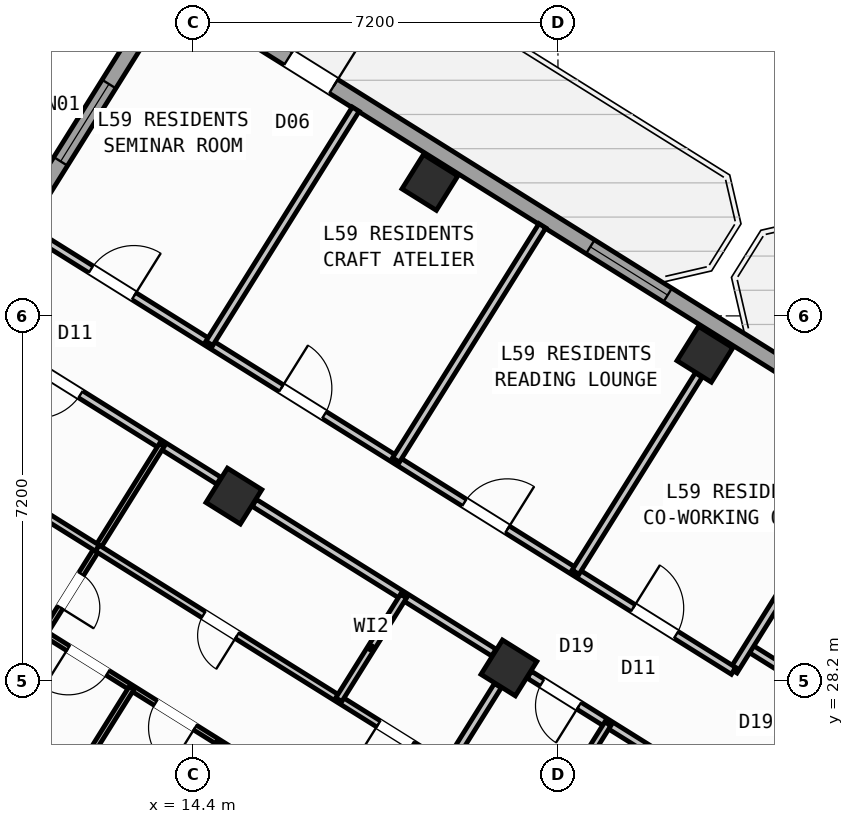
"""IFC4 building model, lengths in metres.
Left out: names, types, materials, properties, quantities, classifications, styles, units other than length and angle.
Written with IfcOpenShell. Run it as: python <this file> out.ifc"""

import sys

from ifc_helpers import new_model, si_unit, direction, frame, frame_2d, origin, origin_2d, place, context, subcontext, project, spatial, rectangle, hollow_rectangle, extrude, source, transform, mapped, element, fill, save


model = new_model("IFC4")
c1 = context("Model", 3, precision=1e-05, world=origin(), true_north=direction((0.0, 1.0)))
c2 = subcontext(c1, "Body", "Model", "MODEL_VIEW")
j1 = project(units=[si_unit("LENGTHUNIT", "METRE"), si_unit("PLANEANGLEUNIT", "RADIAN")], contexts=[c1])
p1 = place(None, origin())
s1 = spatial("IfcSite", under=j1, at=p1, CompositionType="ELEMENT")
p2 = place(p1, origin())
s2 = spatial("IfcBuilding", under=s1, at=p2, CompositionType="ELEMENT")
p3 = place(p2, frame((0.0, 0.0, 233.7)))
s3 = spatial("IfcBuildingStorey", under=s2, at=p3, CompositionType="ELEMENT", Elevation=233.7)
m1 = source(origin(), c2, "Body", "SweptSolid", [
    extrude(hollow_rectangle(XDim=0.8, YDim=0.8, WallThickness=0.032, at=origin_2d()), origin(), (0.0, 0.0, 1.0), 4.8),
])
for number, where, z_axis, x_axis in (
    (1, (24.5, 34.643, 0.0), (0.0, 0.0, 1.0), (-0.848, 0.53, 0.0)),
    (2, (20.632, 28.452, 0.0), (0.0, 0.0, 1.0), (-0.848, 0.53, 0.0)),
    (3, (19.073, 38.034, 0.0), (0.0, 0.0, 1.0), (-0.848, 0.53, 0.0)),
    (4, (15.205, 31.844, 0.0), (0.0, 0.0, 1.0), (-0.848, 0.53, 0.0)),
):
    element("IfcColumn", number, at=place(p3, frame(where, z_axis=z_axis, x_axis=x_axis)), inside=s3, PredefinedType="COLUMN", context=c2, shape_type="MappedRepresentation", body=[
        mapped(m1, transform((0.0, 0.0, 0.0), scale=1.0)),
    ])
p4 = place(p3, frame((2.415, 23.452, 0.0), z_axis=(0.0, 0.0, 1.0), x_axis=(0.52991049553, 0.848053575387, 0.0)))
e5 = element("IfcWall", 5, at=p4, inside=s3, PredefinedType="STANDARD", context=c2, shape_type="SweptSolid", body=[
    extrude(rectangle(XDim=21.587, YDim=0.32, at=frame_2d((10.794, 0.0))), origin(), (0.0, 0.0, 1.0), 4.075),
])
p5 = place(p4, frame((8.026, 0.0, 0.75)))
e6 = element("IfcOpeningElement", 6, at=p5, cuts=e5, PredefinedType="OPENING", context=c2, shape_type="SweptSolid", body=[
    extrude(rectangle(XDim=2.4, YDim=1.6, at=frame_2d((1.2, 0.8))), frame((0.0, 0.17, 0.0), z_axis=(0.0, -1.0, 0.0), x_axis=(1.0, 0.0, 0.0)), (0.0, 0.0, 1.0), 0.34),
])
p6 = place(p4, frame((17.684, 0.0, 0.85)))
e7 = element("IfcOpeningElement", 7, at=p6, cuts=e5, PredefinedType="OPENING", context=c2, shape_type="SweptSolid", body=[
    extrude(rectangle(XDim=1.8, YDim=1.5, at=frame_2d((0.9, 0.75))), frame((0.0, 0.17, 0.0), z_axis=(0.0, -1.0, 0.0), x_axis=(1.0, 0.0, 0.0)), (0.0, 0.0, 1.0), 0.34),
])
p7 = place(p3, frame((14.138, 41.825, 0.0), z_axis=(0.0, 0.0, 1.0), x_axis=(0.848046498049, -0.529921821731, 0.0)))
e8 = element("IfcWall", 8, at=p7, inside=s3, PredefinedType="STANDARD", context=c2, shape_type="SweptSolid", body=[
    extrude(rectangle(XDim=31.588, YDim=0.32, at=frame_2d((15.794, 0.0))), origin(), (0.0, 0.0, 1.0), 4.55),
])
p8 = place(p7, frame((2.526, 0.0, 0.0)))
e9 = element("IfcOpeningElement", 9, at=p8, cuts=e8, PredefinedType="OPENING", context=c2, shape_type="SweptSolid", body=[
    extrude(rectangle(XDim=1.05, YDim=2.15, at=frame_2d((0.525, 1.075))), frame((0.0, 0.17, 0.0), z_axis=(0.0, -1.0, 0.0), x_axis=(1.0, 0.0, 0.0)), (0.0, 0.0, 1.0), 0.34),
])
p9 = place(p7, frame((14.274, 0.0, 0.0)))
e10 = element("IfcOpeningElement", 10, at=p9, cuts=e8, PredefinedType="OPENING", context=c2, shape_type="SweptSolid", body=[
    extrude(rectangle(XDim=1.5, YDim=2.25, at=frame_2d((0.75, 1.125))), frame((0.0, 0.17, 0.0), z_axis=(0.0, -1.0, 0.0), x_axis=(1.0, 0.0, 0.0)), (0.0, 0.0, 1.0), 0.34),
])
p10 = place(p7, frame((0.775, 0.0, 0.95)))
e11 = element("IfcOpeningElement", 11, at=p10, cuts=e8, PredefinedType="OPENING", context=c2, shape_type="SweptSolid", body=[
    extrude(rectangle(XDim=1.2, YDim=1.4, at=frame_2d((0.6, 0.7))), frame((0.0, 0.17, 0.0), z_axis=(0.0, -1.0, 0.0), x_axis=(1.0, 0.0, 0.0)), (0.0, 0.0, 1.0), 0.34),
])
p11 = place(p7, frame((9.552, 0.0, 0.85)))
e12 = element("IfcOpeningElement", 12, at=p11, cuts=e8, PredefinedType="OPENING", context=c2, shape_type="SweptSolid", body=[
    extrude(rectangle(XDim=1.8, YDim=1.5, at=frame_2d((0.9, 0.75))), frame((0.0, 0.17, 0.0), z_axis=(0.0, -1.0, 0.0), x_axis=(1.0, 0.0, 0.0)), (0.0, 0.0, 1.0), 0.34),
])
p12 = place(p7, frame((21.969, 0.0, 0.95)))
e13 = element("IfcOpeningElement", 13, at=p12, cuts=e8, PredefinedType="OPENING", context=c2, shape_type="SweptSolid", body=[
    extrude(rectangle(XDim=1.2, YDim=1.4, at=frame_2d((0.6, 0.7))), frame((0.0, 0.17, 0.0), z_axis=(0.0, -1.0, 0.0), x_axis=(1.0, 0.0, 0.0)), (0.0, 0.0, 1.0), 0.34),
])
p13 = place(p7, frame((27.619, 0.0, 0.95)))
e14 = element("IfcOpeningElement", 14, at=p13, cuts=e8, PredefinedType="OPENING", context=c2, shape_type="SweptSolid", body=[
    extrude(rectangle(XDim=1.2, YDim=1.4, at=frame_2d((0.6, 0.7))), frame((0.0, 0.17, 0.0), z_axis=(0.0, -1.0, 0.0), x_axis=(1.0, 0.0, 0.0)), (0.0, 0.0, 1.0), 0.34),
])
p14 = place(p3, frame((27.57, 27.478, 0.0), z_axis=(0.0, 0.0, 1.0), x_axis=(-0.848050851465, 0.529914854792, 0.0)))
e15 = element("IfcWall", 15, at=p14, inside=s3, PredefinedType="PARTITIONING", context=c2, shape_type="SweptSolid", body=[
    extrude(rectangle(XDim=2.61, YDim=0.16, at=frame_2d((1.305, 0.0))), origin(), (0.0, 0.0, 1.0), 4.54),
])
p15 = place(p14, frame((0.95, 0.0, 0.0)))
e16 = element("IfcOpeningElement", 16, at=p15, cuts=e15, PredefinedType="OPENING", context=c2, shape_type="SweptSolid", body=[
    extrude(rectangle(XDim=0.86, YDim=2.05, at=frame_2d((0.43, 1.025))), frame((0.0, 0.09, 0.0), z_axis=(0.0, -1.0, 0.0), x_axis=(1.0, 0.0, 0.0)), (0.0, 0.0, 1.0), 0.18),
])
p16 = place(p3, frame((27.953, 33.016, 0.0), z_axis=(0.0, 0.0, 1.0), x_axis=(-0.529906322364, -0.848056182997, 0.0)))
e17 = element("IfcWall", 17, at=p16, inside=s3, PredefinedType="PARTITIONING", context=c2, shape_type="SweptSolid", body=[
    extrude(rectangle(XDim=5.45, YDim=0.16, at=frame_2d((2.725, 0.0))), origin(), (0.0, 0.0, 1.0), 4.54),
])
p17 = place(p3, frame((25.065, 28.394, 0.0), z_axis=(0.0, 0.0, 1.0), x_axis=(-0.848048310262, 0.529918921593, 0.0)))
e18 = element("IfcWall", 18, at=p17, inside=s3, PredefinedType="PARTITIONING", context=c2, shape_type="SweptSolid", body=[
    extrude(rectangle(XDim=16.73, YDim=0.16, at=frame_2d((8.365, 0.0))), origin(), (0.0, 0.0, 1.0), 4.54),
])
p18 = place(p17, frame((1.338, 0.0, 0.0)))
e19 = element("IfcOpeningElement", 19, at=p18, cuts=e18, PredefinedType="OPENING", context=c2, shape_type="SweptSolid", body=[
    extrude(rectangle(XDim=1.0, YDim=2.1, at=frame_2d((0.5, 1.05))), frame((0.0, 0.09, 0.0), z_axis=(0.0, -1.0, 0.0), x_axis=(1.0, 0.0, 0.0)), (0.0, 0.0, 1.0), 0.18),
])
p19 = place(p17, frame((5.265, 0.0, 0.0)))
e20 = element("IfcOpeningElement", 20, at=p19, cuts=e18, PredefinedType="OPENING", context=c2, shape_type="SweptSolid", body=[
    extrude(rectangle(XDim=1.0, YDim=2.1, at=frame_2d((0.5, 1.05))), frame((0.0, 0.09, 0.0), z_axis=(0.0, -1.0, 0.0), x_axis=(1.0, 0.0, 0.0)), (0.0, 0.0, 1.0), 0.18),
])
p20 = place(p17, frame((9.526, 0.0, 0.0)))
e21 = element("IfcOpeningElement", 21, at=p20, cuts=e18, PredefinedType="OPENING", context=c2, shape_type="SweptSolid", body=[
    extrude(rectangle(XDim=1.0, YDim=2.1, at=frame_2d((0.5, 1.05))), frame((0.0, 0.09, 0.0), z_axis=(0.0, -1.0, 0.0), x_axis=(1.0, 0.0, 0.0)), (0.0, 0.0, 1.0), 0.18),
])
p21 = place(p17, frame((13.954, 0.0, 0.0)))
e22 = element("IfcOpeningElement", 22, at=p21, cuts=e18, PredefinedType="OPENING", context=c2, shape_type="SweptSolid", body=[
    extrude(rectangle(XDim=1.0, YDim=2.1, at=frame_2d((0.5, 1.05))), frame((0.0, 0.09, 0.0), z_axis=(0.0, -1.0, 0.0), x_axis=(1.0, 0.0, 0.0)), (0.0, 0.0, 1.0), 0.18),
])
p22 = place(p3, frame((23.899, 26.529, 0.0), z_axis=(0.0, 0.0, 1.0), x_axis=(-0.848055143312, 0.529907986259, 0.0)))
e23 = element("IfcWall", 23, at=p22, inside=s3, PredefinedType="PARTITIONING", context=c2, shape_type="SweptSolid", body=[
    extrude(rectangle(XDim=3.378, YDim=0.16, at=frame_2d((1.689, 0.0))), origin(), (0.0, 0.0, 1.0), 4.075),
])
p23 = place(p22, frame((2.22, 0.0, 0.0)))
e24 = element("IfcOpeningElement", 24, at=p23, cuts=e23, PredefinedType="OPENING", context=c2, shape_type="SweptSolid", body=[
    extrude(rectangle(XDim=0.86, YDim=2.05, at=frame_2d((0.43, 1.025))), frame((0.0, 0.09, 0.0), z_axis=(0.0, -1.0, 0.0), x_axis=(1.0, 0.0, 0.0)), (0.0, 0.0, 1.0), 0.18),
])
p24 = place(p3, frame((20.336, 28.755, 0.0), z_axis=(0.0, 0.0, 1.0), x_axis=(-0.848049955116, 0.529916289265, 0.0)))
e25 = element("IfcWall", 25, at=p24, inside=s3, PredefinedType="PARTITIONING", context=c2, shape_type="SweptSolid", body=[
    extrude(rectangle(XDim=5.576, YDim=0.16, at=frame_2d((2.788, 0.0))), origin(), (0.0, 0.0, 1.0), 4.075),
])
p25 = place(p3, frame((14.908, 32.147, 0.0), z_axis=(0.0, 0.0, 1.0), x_axis=(-0.848049955116, 0.529916289265, 0.0)))
e26 = element("IfcWall", 26, at=p25, inside=s3, PredefinedType="PARTITIONING", context=c2, shape_type="SweptSolid", body=[
    extrude(rectangle(XDim=5.576, YDim=0.16, at=frame_2d((2.788, 0.0))), origin(), (0.0, 0.0, 1.0), 4.075),
])
p26 = place(p25, frame((3.218, 0.0, 0.0)))
e27 = element("IfcOpeningElement", 27, at=p26, cuts=e26, PredefinedType="OPENING", context=c2, shape_type="SweptSolid", body=[
    extrude(rectangle(XDim=1.0, YDim=2.1, at=frame_2d((0.5, 1.05))), frame((0.0, 0.09, 0.0), z_axis=(0.0, -1.0, 0.0), x_axis=(1.0, 0.0, 0.0)), (0.0, 0.0, 1.0), 0.18),
])
p27 = place(p3, frame((20.414, 28.103, 0.0), z_axis=(0.0, 0.0, 1.0), x_axis=(-0.529934553702, -0.848038542045, 0.0)))
e28 = element("IfcWall", 28, at=p27, inside=s3, PredefinedType="PARTITIONING", context=c2, shape_type="SweptSolid", body=[
    extrude(rectangle(XDim=6.476, YDim=0.16, at=frame_2d((3.238, 0.0))), origin(), (0.0, 0.0, 1.0), 4.075),
])
p28 = place(p3, frame((22.585, 27.35, 0.0), z_axis=(0.0, 0.0, 1.0), x_axis=(-0.529977067289, -0.848011974059, 0.0)))
e29 = element("IfcWall", 29, at=p28, inside=s3, PredefinedType="PLUMBINGWALL", context=c2, shape_type="SweptSolid", body=[
    extrude(rectangle(XDim=3.01, YDim=0.14, at=frame_2d((1.505, 0.0))), origin(), (0.0, 0.0, 1.0), 4.225),
])
p29 = place(p28, frame((1.115, 0.0, 0.0)))
e30 = element("IfcOpeningElement", 30, at=p29, cuts=e29, PredefinedType="OPENING", context=c2, shape_type="SweptSolid", body=[
    extrude(rectangle(XDim=0.78, YDim=2.05, at=frame_2d((0.39, 1.025))), frame((0.0, 0.08, 0.0), z_axis=(0.0, -1.0, 0.0), x_axis=(1.0, 0.0, 0.0)), (0.0, 0.0, 1.0), 0.16),
])
p30 = place(p3, frame((13.782, 32.85, 0.0), z_axis=(0.0, 0.0, 1.0), x_axis=(-0.529928444178, -0.848042359821, 0.0)))
e31 = element("IfcWall", 31, at=p30, inside=s3, PredefinedType="PARTITIONING", context=c2, shape_type="SweptSolid", body=[
    extrude(rectangle(XDim=14.32, YDim=0.11, at=frame_2d((7.16, 0.0))), origin(), (0.0, 0.0, 1.0), 4.54),
])
p31 = place(p30, frame((3.0, 0.0, 0.0)))
e32 = element("IfcOpeningElement", 32, at=p31, cuts=e31, PredefinedType="OPENING", context=c2, shape_type="SweptSolid", body=[
    extrude(rectangle(XDim=0.78, YDim=2.05, at=frame_2d((0.39, 1.025))), frame((0.0, 0.065, 0.0), z_axis=(0.0, -1.0, 0.0), x_axis=(1.0, 0.0, 0.0)), (0.0, 0.0, 1.0), 0.13),
])
p32 = place(p3, frame((12.51, 30.815, 0.0), z_axis=(0.0, 0.0, 1.0), x_axis=(-0.848041344127, 0.529930069585, 0.0)))
e33 = element("IfcWall", 33, at=p32, inside=s3, PredefinedType="PLUMBINGWALL", context=c2, shape_type="SweptSolid", body=[
    extrude(rectangle(XDim=4.78, YDim=0.14, at=frame_2d((2.39, 0.0))), origin(), (0.0, 0.0, 1.0), 4.54),
])
p33 = place(p32, frame((1.93, 0.0, 0.0)))
e34 = element("IfcOpeningElement", 34, at=p33, cuts=e33, PredefinedType="OPENING", context=c2, shape_type="SweptSolid", body=[
    extrude(rectangle(XDim=0.92, YDim=2.08, at=frame_2d((0.46, 1.04))), frame((0.0, 0.08, 0.0), z_axis=(0.0, -1.0, 0.0), x_axis=(1.0, 0.0, 0.0)), (0.0, 0.0, 1.0), 0.16),
])
p34 = place(p3, frame((19.413, 26.501, 0.0), z_axis=(0.0, 0.0, 1.0), x_axis=(-0.84804547861, 0.52992345316, 0.0)))
e35 = element("IfcWall", 35, at=p34, inside=s3, PredefinedType="PLUMBINGWALL", context=c2, shape_type="SweptSolid", body=[
    extrude(rectangle(XDim=8.14, YDim=0.14, at=frame_2d((4.07, 0.0))), origin(), (0.0, 0.0, 1.0), 4.54),
])
p35 = place(p34, frame((4.887, 0.0, 0.0)))
e36 = element("IfcOpeningElement", 36, at=p35, cuts=e35, PredefinedType="OPENING", context=c2, shape_type="SweptSolid", body=[
    extrude(rectangle(XDim=0.78, YDim=2.05, at=frame_2d((0.39, 1.025))), frame((0.0, 0.08, 0.0), z_axis=(0.0, -1.0, 0.0), x_axis=(1.0, 0.0, 0.0)), (0.0, 0.0, 1.0), 0.16),
])
p36 = place(p34, frame((0.817, 0.0, 0.0)))
e37 = element("IfcOpeningElement", 37, at=p36, cuts=e35, PredefinedType="OPENING", context=c2, shape_type="SweptSolid", body=[
    extrude(rectangle(XDim=0.78, YDim=2.05, at=frame_2d((0.39, 1.025))), frame((0.0, 0.08, 0.0), z_axis=(0.0, -1.0, 0.0), x_axis=(1.0, 0.0, 0.0)), (0.0, 0.0, 1.0), 0.16),
])
p37 = place(p3, frame((18.552, 29.87, 0.0), z_axis=(0.0, 0.0, 1.0), x_axis=(-0.529935194983, -0.848038141311, 0.0)))
e38 = element("IfcWall", 38, at=p37, inside=s3, PredefinedType="PLUMBINGWALL", context=c2, shape_type="SweptSolid", body=[
    extrude(rectangle(XDim=2.41, YDim=0.14, at=frame_2d((1.205, 0.0))), origin(), (0.0, 0.0, 1.0), 4.54),
])
p38 = place(p3, frame((18.364, 24.823, 0.0), z_axis=(0.0, 0.0, 1.0), x_axis=(-0.848050534792, 0.529915361581, 0.0)))
e39 = element("IfcWall", 39, at=p38, inside=s3, PredefinedType="PARTITIONING", context=c2, shape_type="SweptSolid", body=[
    extrude(rectangle(XDim=8.14, YDim=0.11, at=frame_2d((4.07, 0.0))), origin(), (0.0, 0.0, 1.0), 4.54),
])
p39 = place(p38, frame((0.558, 0.0, 0.0)))
e40 = element("IfcOpeningElement", 40, at=p39, cuts=e39, PredefinedType="OPENING", context=c2, shape_type="SweptSolid", body=[
    extrude(rectangle(XDim=0.92, YDim=2.08, at=frame_2d((0.46, 1.04))), frame((0.0, 0.065, 0.0), z_axis=(0.0, -1.0, 0.0), x_axis=(1.0, 0.0, 0.0)), (0.0, 0.0, 1.0), 0.13),
])
p40 = place(p38, frame((2.593, 0.0, 0.0)))
e41 = element("IfcOpeningElement", 41, at=p40, cuts=e39, PredefinedType="OPENING", context=c2, shape_type="SweptSolid", body=[
    extrude(rectangle(XDim=0.92, YDim=2.08, at=frame_2d((0.46, 1.04))), frame((0.0, 0.065, 0.0), z_axis=(0.0, -1.0, 0.0), x_axis=(1.0, 0.0, 0.0)), (0.0, 0.0, 1.0), 0.13),
])
p41 = place(p38, frame((4.627, 0.0, 0.0)))
e42 = element("IfcOpeningElement", 42, at=p41, cuts=e39, PredefinedType="OPENING", context=c2, shape_type="SweptSolid", body=[
    extrude(rectangle(XDim=0.92, YDim=2.08, at=frame_2d((0.46, 1.04))), frame((0.0, 0.065, 0.0), z_axis=(0.0, -1.0, 0.0), x_axis=(1.0, 0.0, 0.0)), (0.0, 0.0, 1.0), 0.13),
])
p42 = place(p38, frame((6.663, 0.0, 0.0)))
e43 = element("IfcOpeningElement", 43, at=p42, cuts=e39, PredefinedType="OPENING", context=c2, shape_type="SweptSolid", body=[
    extrude(rectangle(XDim=0.92, YDim=2.08, at=frame_2d((0.46, 1.04))), frame((0.0, 0.065, 0.0), z_axis=(0.0, -1.0, 0.0), x_axis=(1.0, 0.0, 0.0)), (0.0, 0.0, 1.0), 0.13),
])
p43 = place(p3, frame((14.912, 26.979, 0.0), z_axis=(0.0, 0.0, 1.0), x_axis=(-0.529910626741, -0.8480534934, 0.0)))
e44 = element("IfcWall", 44, at=p43, inside=s3, PredefinedType="PARTITIONING", context=c2, shape_type="SweptSolid", body=[
    extrude(rectangle(XDim=9.94, YDim=0.11, at=frame_2d((4.97, 0.0))), origin(), (0.0, 0.0, 1.0), 4.225),
])
p44 = place(p3, frame((13.187, 28.058, 0.0), z_axis=(0.0, 0.0, 1.0), x_axis=(-0.529872708847, -0.848077185414, 0.0)))
e45 = element("IfcWall", 45, at=p44, inside=s3, PredefinedType="PARTITIONING", context=c2, shape_type="SweptSolid", body=[
    extrude(rectangle(XDim=2.608, YDim=0.11, at=frame_2d((1.304, 0.0))), origin(), (0.0, 0.0, 1.0), 4.54),
])
p45 = place(p3, frame((24.379, 34.233, 0.0), z_axis=(0.0, 0.0, 1.0), x_axis=(-0.529922402838, -0.84804613493, 0.0)))
e46 = element("IfcWall", 46, at=p45, inside=s3, PredefinedType="PARTITIONING", context=c2, shape_type="SweptSolid", body=[
    extrude(rectangle(XDim=4.588, YDim=0.16, at=frame_2d((2.294, 0.0))), origin(), (0.0, 0.0, 1.0), 4.075),
])
for number, where, z_axis, x_axis in (
    (47, (21.292, 37.178, 0.0), (0.0, 0.0, 1.0), (-0.53, -0.848, 0.0)),
    (48, (17.608, 39.48, 0.0), (0.0, 0.0, 1.0), (-0.53, -0.848, 0.0)),
):
    element("IfcWall", number, at=place(p3, frame(where, z_axis=z_axis, x_axis=x_axis)), inside=s3, PredefinedType="PARTITIONING", context=c2, shape_type="SweptSolid", body=[
        extrude(rectangle(XDim=5.45, YDim=0.16, at=frame_2d((2.725, 0.0))), origin(), (0.0, 0.0, 1.0), 4.225),
    ])
m2 = source(origin(), c2, "Body", "SweptSolid", [
    extrude(rectangle(XDim=1.05, YDim=2.15, at=frame_2d((0.525, 1.075))), frame((0.0, 0.025, 0.0), z_axis=(0.0, -1.0, 0.0), x_axis=(1.0, 0.0, 0.0)), (0.0, 0.0, 1.0), 0.05),
])
p46 = place(p8, origin())
e49 = element("IfcDoor", 49, at=p46, inside=s3, OperationType="SINGLE_SWING_RIGHT", PredefinedType="DOOR", context=c2, shape_type="MappedRepresentation", body=[
    mapped(m2, transform((0.0, 0.0, 0.0), scale=1.0)),
])
fill(e9, e49)
m3 = source(origin(), c2, "Body", "SweptSolid", [
    extrude(rectangle(XDim=1.8, YDim=1.5, at=frame_2d((0.9, 0.75))), frame((0.0, 0.03, 0.0), z_axis=(0.0, -1.0, 0.0), x_axis=(1.0, 0.0, 0.0)), (0.0, 0.0, 1.0), 0.06),
])
p47 = place(p6, origin())
e50 = element("IfcWindow", 50, at=p47, inside=s3, PartitioningType="SINGLE_PANEL", PredefinedType="WINDOW", context=c2, shape_type="MappedRepresentation", body=[
    mapped(m3, transform((0.0, 0.0, 0.0), scale=1.0)),
])
fill(e7, e50)
p48 = place(p11, origin())
e51 = element("IfcWindow", 51, at=p48, inside=s3, PartitioningType="SINGLE_PANEL", PredefinedType="WINDOW", context=c2, shape_type="MappedRepresentation", body=[
    mapped(m3, transform((0.0, 0.0, 0.0), scale=1.0)),
])
fill(e12, e51)
m4 = source(origin(), c2, "Body", "SweptSolid", [
    extrude(rectangle(XDim=0.86, YDim=2.05, at=frame_2d((0.43, 1.025))), frame((0.0, 0.025, 0.0), z_axis=(0.0, -1.0, 0.0), x_axis=(1.0, 0.0, 0.0)), (0.0, 0.0, 1.0), 0.05),
])
p49 = place(p23, origin())
e52 = element("IfcDoor", 52, at=p49, inside=s3, OperationType="SINGLE_SWING_LEFT", PredefinedType="DOOR", context=c2, shape_type="MappedRepresentation", body=[
    mapped(m4, transform((0.0, 0.0, 0.0), scale=1.0)),
])
fill(e24, e52)
m5 = source(origin(), c2, "Body", "SweptSolid", [
    extrude(rectangle(XDim=1.0, YDim=2.1, at=frame_2d((0.5, 1.05))), frame((0.0, 0.025, 0.0), z_axis=(0.0, -1.0, 0.0), x_axis=(1.0, 0.0, 0.0)), (0.0, 0.0, 1.0), 0.05),
])
p50 = place(p26, origin())
e53 = element("IfcDoor", 53, at=p50, inside=s3, OperationType="SINGLE_SWING_RIGHT", PredefinedType="DOOR", context=c2, shape_type="MappedRepresentation", body=[
    mapped(m5, transform((0.0, 0.0, 0.0), scale=1.0)),
])
fill(e27, e53)
m6 = source(origin(), c2, "Body", "SweptSolid", [
    extrude(rectangle(XDim=0.78, YDim=2.05, at=frame_2d((0.39, 1.025))), frame((0.0, 0.025, 0.0), z_axis=(0.0, -1.0, 0.0), x_axis=(1.0, 0.0, 0.0)), (0.0, 0.0, 1.0), 0.05),
])
p51 = place(p31, origin())
e54 = element("IfcDoor", 54, at=p51, inside=s3, OperationType="SINGLE_SWING_RIGHT", PredefinedType="DOOR", context=c2, shape_type="MappedRepresentation", body=[
    mapped(m6, transform((0.0, 0.0, 0.0), scale=1.0)),
])
fill(e32, e54)
p52 = place(p35, origin())
e55 = element("IfcDoor", 55, at=p52, inside=s3, OperationType="SINGLE_SWING_LEFT", PredefinedType="DOOR", context=c2, shape_type="MappedRepresentation", body=[
    mapped(m6, transform((0.0, 0.0, 0.0), scale=1.0)),
])
fill(e36, e55)
p53 = place(p36, origin())
e56 = element("IfcDoor", 56, at=p53, inside=s3, OperationType="SINGLE_SWING_RIGHT", PredefinedType="DOOR", context=c2, shape_type="MappedRepresentation", body=[
    mapped(m6, transform((0.0, 0.0, 0.0), scale=1.0)),
])
fill(e37, e56)
m7 = source(origin(), c2, "Body", "SweptSolid", [
    extrude(rectangle(XDim=0.92, YDim=2.08, at=frame_2d((0.46, 1.04))), frame((0.0, 0.025, 0.0), z_axis=(0.0, -1.0, 0.0), x_axis=(1.0, 0.0, 0.0)), (0.0, 0.0, 1.0), 0.05),
])
p54 = place(p41, origin())
e57 = element("IfcDoor", 57, at=p54, inside=s3, OperationType="SINGLE_SWING_LEFT", PredefinedType="DOOR", context=c2, shape_type="MappedRepresentation", body=[
    mapped(m7, transform((0.0, 0.0, 0.0), scale=1.0)),
])
fill(e42, e57)
p55 = place(p42, origin())
e58 = element("IfcDoor", 58, at=p55, inside=s3, OperationType="SINGLE_SWING_RIGHT", PredefinedType="DOOR", context=c2, shape_type="MappedRepresentation", body=[
    mapped(m7, transform((0.0, 0.0, 0.0), scale=1.0)),
])
fill(e43, e58)
p56 = place(p18, frame((1.0, 0.0, 0.0), z_axis=(0.0, 0.0, 1.0), x_axis=(-1.0, 0.0, 0.0)))
e59 = element("IfcDoor", 59, at=p56, inside=s3, OperationType="SINGLE_SWING_LEFT", PredefinedType="DOOR", context=c2, shape_type="MappedRepresentation", body=[
    mapped(m5, transform((0.0, 0.0, 0.0), scale=1.0)),
])
fill(e19, e59)
p57 = place(p19, frame((1.0, 0.0, 0.0), z_axis=(0.0, 0.0, 1.0), x_axis=(-1.0, 0.0, 0.0)))
e60 = element("IfcDoor", 60, at=p57, inside=s3, OperationType="SINGLE_SWING_RIGHT", PredefinedType="DOOR", context=c2, shape_type="MappedRepresentation", body=[
    mapped(m5, transform((0.0, 0.0, 0.0), scale=1.0)),
])
fill(e20, e60)
p58 = place(p20, frame((1.0, 0.0, 0.0), z_axis=(0.0, 0.0, 1.0), x_axis=(-1.0, 0.0, 0.0)))
e61 = element("IfcDoor", 61, at=p58, inside=s3, OperationType="SINGLE_SWING_LEFT", PredefinedType="DOOR", context=c2, shape_type="MappedRepresentation", body=[
    mapped(m5, transform((0.0, 0.0, 0.0), scale=1.0)),
])
fill(e21, e61)
p59 = place(p21, frame((1.0, 0.0, 0.0), z_axis=(0.0, 0.0, 1.0), x_axis=(-1.0, 0.0, 0.0)))
e62 = element("IfcDoor", 62, at=p59, inside=s3, OperationType="SINGLE_SWING_RIGHT", PredefinedType="DOOR", context=c2, shape_type="MappedRepresentation", body=[
    mapped(m5, transform((0.0, 0.0, 0.0), scale=1.0)),
])
fill(e22, e62)
save(model, sys.argv[1])
